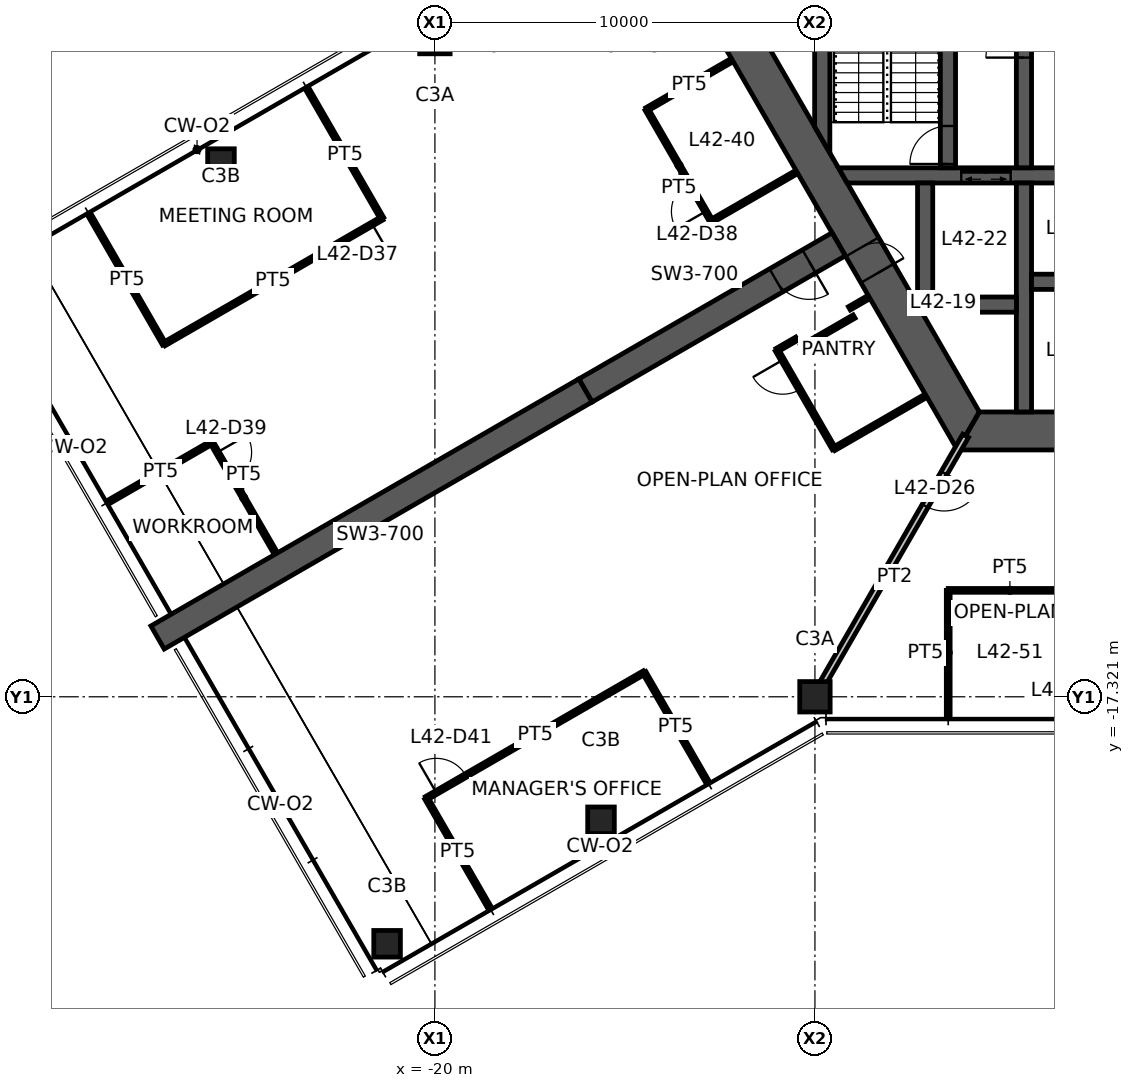
"""IFC4 building model, lengths in metres.
Left out: names, types, materials, properties, quantities, classifications, styles, units other than length and angle.
Written with IfcOpenShell. Run it as: python <this file> out.ifc"""

import sys

from ifc_helpers import new_model, si_unit, direction, frame, frame_2d, origin, origin_2d, place, context, subcontext, project, spatial, polyline, rectangle, hollow_rectangle, outline, extrude, element, fill, save


model = new_model("IFC4")
c1 = context("Model", 3, precision=1e-05, world=origin(), true_north=direction((0.0, 1.0)))
c2 = subcontext(c1, "Body", "Model", "MODEL_VIEW")
j1 = project(units=[si_unit("LENGTHUNIT", "METRE"), si_unit("PLANEANGLEUNIT", "RADIAN")], contexts=[c1])
p1 = place(None, origin())
s1 = spatial("IfcSite", under=j1, at=p1, CompositionType="ELEMENT")
p2 = place(p1, origin())
s2 = spatial("IfcBuilding", under=s1, at=p2, CompositionType="ELEMENT")
p3 = place(p2, frame((0.0, 0.0, 168.2)))
s3 = spatial("IfcBuildingStorey", under=s2, at=p3, CompositionType="ELEMENT", Elevation=168.2)
for number, where, z_axis, x_axis in (
    (1, (-20.0, 0.0, 0.0), (0.0, 0.0, 1.0), (1.0, 0.0, 0.0)),
    (2, (-10.0, -17.321, 0.0), (0.0, 0.0, 1.0), (1.0, 0.0, 0.0)),
):
    element("IfcColumn", number, at=place(p3, frame(where, z_axis=z_axis, x_axis=x_axis)), inside=s3, PredefinedType="COLUMN", context=c2, shape_type="SweptSolid", body=[
        extrude(hollow_rectangle(XDim=0.8, YDim=0.8, WallThickness=0.045, at=origin_2d()), origin(), (0.0, 0.0, 1.0), 3.9),
    ])
for number, where, z_axis, x_axis in (
    (3, (-25.629, -3.25, 0.0), (0.0, 0.0, 1.0), (1.0, 0.0, 0.0)),
    (4, (-15.629, -20.571, 0.0), (0.0, 0.0, 1.0), (1.0, 0.0, 0.0)),
    (5, (-21.258, -23.821, 0.0), (0.0, 0.0, 1.0), (1.0, 0.0, 0.0)),
):
    element("IfcColumn", number, at=place(p3, frame(where, z_axis=z_axis, x_axis=x_axis)), inside=s3, PredefinedType="COLUMN", context=c2, shape_type="SweptSolid", body=[
        extrude(hollow_rectangle(XDim=0.7, YDim=0.7, WallThickness=0.036, at=origin_2d()), origin(), (0.0, 0.0, 1.0), 3.9),
    ])
p4 = place(p3, frame((-11.922, 0.0, 0.0), z_axis=(0.0, 0.0, 1.0), x_axis=(0.500004296715, -0.866022923061, 0.0)))
e6 = element("IfcWall", 6, at=p4, inside=s3, PredefinedType="SHEAR", context=c2, shape_type="SweptSolid", body=[
    extrude(outline(polyline([(-0.289, -0.5), (6.331, -0.5), (7.131, -0.5), (12.211, -0.5), (11.634, 0.5), (7.131, 0.5), (6.331, 0.5), (0.289, 0.5), (-0.289, -0.5)])), origin(), (0.0, 0.0, 1.0), 3.9),
])
p5 = place(p4, frame((6.331, 0.0, 0.0)))
e7 = element("IfcOpeningElement", 7, at=p5, cuts=e6, PredefinedType="OPENING", context=c2, shape_type="SweptSolid", body=[
    extrude(rectangle(XDim=0.8, YDim=2.1, at=frame_2d((0.4, 1.05))), frame((0.0, 0.51, 0.0), z_axis=(0.0, -1.0, 0.0), x_axis=(1.0, 0.0, 0.0)), (0.0, 0.0, 1.0), 1.02),
])
p6 = place(p3, frame((-5.961, -10.325, 0.0), z_axis=(0.0, 0.0, 1.0), x_axis=(1.0, 0.0, 0.0)))
e8 = element("IfcWall", 8, at=p6, inside=s3, PredefinedType="SHEAR", context=c2, shape_type="SweptSolid", body=[
    extrude(outline(polyline([(-0.289, -0.5), (5.461, -0.5), (6.461, -0.5), (12.211, -0.5), (11.634, 0.5), (6.461, 0.5), (5.461, 0.5), (0.289, 0.5), (-0.289, -0.5)])), origin(), (0.0, 0.0, 1.0), 3.9),
])
p7 = place(p6, frame((5.461, 0.0, 0.0)))
e9 = element("IfcOpeningElement", 9, at=p7, cuts=e8, PredefinedType="OPENING", context=c2, shape_type="SweptSolid", body=[
    extrude(rectangle(XDim=1.0, YDim=2.1, at=frame_2d((0.5, 1.05))), frame((0.0, 0.51, 0.0), z_axis=(0.0, -1.0, 0.0), x_axis=(1.0, 0.0, 0.0)), (0.0, 0.0, 1.0), 1.02),
])
p8 = place(p3, frame((-9.375, -5.413, 0.0), z_axis=(0.0, 0.0, 1.0), x_axis=(-0.866032377459, -0.499987921047, 0.0)))
e10 = element("IfcWall", 10, at=p8, inside=s3, PredefinedType="SHEAR", context=c2, shape_type="SweptSolid", body=[
    extrude(rectangle(XDim=7.696, YDim=0.7, at=frame_2d((3.848, 0.0))), origin(), (0.0, 0.0, 1.0), 3.9),
])
p9 = place(p8, frame((0.9, 0.0, 0.0)))
e11 = element("IfcOpeningElement", 11, at=p9, cuts=e10, PredefinedType="OPENING", context=c2, shape_type="SweptSolid", body=[
    extrude(rectangle(XDim=1.0, YDim=2.1, at=frame_2d((0.5, 1.05))), frame((0.0, 0.36, 0.0), z_axis=(0.0, -1.0, 0.0), x_axis=(1.0, 0.0, 0.0)), (0.0, 0.0, 1.0), 0.72),
])
p10 = place(p3, frame((-16.039, -9.26, 0.0), z_axis=(0.0, 0.0, 1.0), x_axis=(-0.866024837091, -0.50000098154, 0.0)))
e12 = element("IfcWall", 12, at=p10, inside=s3, PredefinedType="SHEAR", context=c2, shape_type="SweptSolid", body=[
    extrude(rectangle(XDim=13.0, YDim=0.7, at=frame_2d((6.5, 0.0))), origin(), (0.0, 0.0, 1.0), 3.9),
])
p11 = place(p3, frame((-9.266, -3.6, 0.0), z_axis=(0.0, 0.0, 1.0), x_axis=(1.0, 0.0, 0.0)))
e13 = element("IfcWall", 13, at=p11, inside=s3, PredefinedType="SHEAR", context=c2, shape_type="SweptSolid", body=[
    extrude(outline(polyline([(0.115, -0.2), (3.116, -0.2), (4.417, -0.2), (5.667, -0.2), (6.767, -0.2), (7.866, -0.2), (7.866, 0.2), (6.767, 0.2), (5.667, 0.2), (4.417, 0.2), (3.116, 0.2), (-0.115, 0.2), (0.115, -0.2)])), origin(), (0.0, 0.0, 1.0), 3.9),
])
p12 = place(p11, frame((5.667, 0.0, 0.0)))
e14 = element("IfcOpeningElement", 14, at=p12, cuts=e13, PredefinedType="OPENING", context=c2, shape_type="SweptSolid", body=[
    extrude(rectangle(XDim=1.1, YDim=2.1, at=frame_2d((0.55, 1.05))), frame((0.0, 0.21, 0.0), z_axis=(0.0, -1.0, 0.0), x_axis=(1.0, 0.0, 0.0)), (0.0, 0.0, 1.0), 0.42),
])
p13 = place(p11, frame((3.116, 0.0, 0.0)))
e15 = element("IfcOpeningElement", 15, at=p13, cuts=e13, PredefinedType="OPENING", context=c2, shape_type="SweptSolid", body=[
    extrude(rectangle(XDim=1.3, YDim=2.1, at=frame_2d((0.65, 1.05))), frame((0.0, 0.21, 0.0), z_axis=(0.0, -1.0, 0.0), x_axis=(1.0, 0.0, 0.0)), (0.0, 0.0, 1.0), 0.42),
])
p14 = place(p3, frame((-4.5, -3.4, 0.0), z_axis=(0.0, 0.0, 1.0), x_axis=(0.0, 1.0, 0.0)))
e16 = element("IfcWall", 16, at=p14, inside=s3, PredefinedType="SHEAR", context=c2, shape_type="SweptSolid", body=[
    extrude(rectangle(XDim=6.8, YDim=0.4, at=frame_2d((3.4, 0.0))), origin(), (0.0, 0.0, 1.0), 3.9),
])
p15 = place(p14, frame((2.9, 0.0, 0.0)))
e17 = element("IfcOpeningElement", 17, at=p15, cuts=e16, PredefinedType="OPENING", context=c2, shape_type="SweptSolid", body=[
    extrude(rectangle(XDim=1.0, YDim=2.1, at=frame_2d((0.5, 1.05))), frame((0.0, 0.21, 0.0), z_axis=(0.0, -1.0, 0.0), x_axis=(1.0, 0.0, 0.0)), (0.0, 0.0, 1.0), 0.42),
])
p16 = place(p3, frame((-6.5, -3.4, 0.0), z_axis=(0.0, 0.0, 1.0), x_axis=(0.0, 1.0, 0.0)))
e18 = element("IfcWall", 18, at=p16, inside=s3, PredefinedType="SHEAR", context=c2, shape_type="SweptSolid", body=[
    extrude(rectangle(XDim=6.8, YDim=0.4, at=frame_2d((3.4, 0.0))), origin(), (0.0, 0.0, 1.0), 3.9),
])
p17 = place(p16, frame((0.1, 0.0, 0.0)))
e19 = element("IfcOpeningElement", 19, at=p17, cuts=e18, PredefinedType="OPENING", context=c2, shape_type="SweptSolid", body=[
    extrude(rectangle(XDim=1.0, YDim=2.1, at=frame_2d((0.5, 1.05))), frame((0.0, 0.21, 0.0), z_axis=(0.0, -1.0, 0.0), x_axis=(1.0, 0.0, 0.0)), (0.0, 0.0, 1.0), 0.42),
])
p18 = place(p3, frame((-4.5, -3.8, 0.0), z_axis=(0.0, 0.0, 1.0), x_axis=(0.0, -1.0, 0.0)))
e20 = element("IfcWall", 20, at=p18, inside=s3, PredefinedType="SHEAR", context=c2, shape_type="SweptSolid", body=[
    extrude(rectangle(XDim=6.025, YDim=0.4, at=frame_2d((3.012, 0.0))), origin(), (0.0, 0.0, 1.0), 3.9),
])
p19 = place(p3, frame((-4.3, -6.4, 0.0), z_axis=(0.0, 0.0, 1.0), x_axis=(1.0, 0.0, 0.0)))
e21 = element("IfcWall", 21, at=p19, inside=s3, PredefinedType="SHEAR", context=c2, shape_type="SweptSolid", body=[
    extrude(rectangle(XDim=2.5, YDim=0.4, at=frame_2d((1.25, 0.0))), origin(), (0.0, 0.0, 1.0), 3.9),
])
p20 = place(p3, frame((-6.9, -7.0, 0.0), z_axis=(0.0, 0.0, 1.0), x_axis=(1.0, 0.0, 0.0)))
e22 = element("IfcWall", 22, at=p20, inside=s3, PredefinedType="SHEAR", context=c2, shape_type="SweptSolid", body=[
    extrude(rectangle(XDim=2.2, YDim=0.4, at=frame_2d((1.1, 0.0))), origin(), (0.0, 0.0, 1.0), 3.9),
])
p21 = place(p3, frame((-7.1, -3.8, 0.0), z_axis=(0.0, 0.0, 1.0), x_axis=(0.0, -1.0, 0.0)))
e23 = element("IfcWall", 23, at=p21, inside=s3, PredefinedType="SHEAR", context=c2, shape_type="SweptSolid", body=[
    extrude(outline(polyline([(0.0, -0.2), (3.206, -0.2), (3.4, 0.0), (3.4, 0.2), (0.0, 0.2), (0.0, -0.2)])), origin(), (0.0, 0.0, 1.0), 3.9),
])
p22 = place(p3, frame((-9.808, -2.662, 0.0), z_axis=(0.0, 0.0, 1.0), x_axis=(0.0, 1.0, 0.0)))
e24 = element("IfcWall", 24, at=p22, inside=s3, PredefinedType="SHEAR", context=c2, shape_type="SweptSolid", body=[
    extrude(outline(polyline([(-0.346, -0.2), (5.671, -0.2), (4.978, 0.2), (0.346, 0.2), (-0.346, -0.2)])), origin(), (0.0, 0.0, 1.0), 3.9),
])
p23 = place(p3, frame((-6.035, -10.453, 0.0), z_axis=(0.0, 0.0, 1.0), x_axis=(-0.499989830942, -0.866031274813, 0.0)))
e25 = element("IfcWall", 25, at=p23, inside=s3, PredefinedType="PARTITIONING", context=c2, shape_type="SweptSolid", body=[
    extrude(rectangle(XDim=7.93, YDim=0.175, at=frame_2d((3.965, 0.0))), origin(), (0.0, 0.0, 1.0), 3.05),
])
p24 = place(p23, frame((1.13, 0.0, 0.0)))
e26 = element("IfcOpeningElement", 26, at=p24, cuts=e25, PredefinedType="OPENING", context=c2, shape_type="SweptSolid", body=[
    extrude(rectangle(XDim=1.0, YDim=2.1, at=frame_2d((0.5, 1.05))), frame((0.0, 0.098, 0.0), z_axis=(0.0, -1.0, 0.0), x_axis=(1.0, 0.0, 0.0)), (0.0, 0.0, 1.0), 0.195),
])
p25 = place(p3, frame((-27.125, -8.04, 0.0), z_axis=(0.0, 0.0, 1.0), x_axis=(-0.499978621081, 0.866037746557, 0.0)))
e27 = element("IfcWall", 27, at=p25, inside=s3, PredefinedType="PARTITIONING", context=c2, shape_type="SweptSolid", body=[
    extrude(rectangle(XDim=3.905, YDim=0.1, at=frame_2d((1.953, 0.0))), origin(), (0.0, 0.0, 1.0), 2.95),
])
p26 = place(p3, frame((-23.332, -1.37, 0.0), z_axis=(0.0, 0.0, 1.0), x_axis=(0.500043804875, -0.866000111551, 0.0)))
e28 = element("IfcWall", 28, at=p26, inside=s3, PredefinedType="PARTITIONING", context=c2, shape_type="SweptSolid", body=[
    extrude(rectangle(XDim=3.88, YDim=0.1, at=frame_2d((1.94, 0.0))), origin(), (0.0, 0.0, 1.0), 2.95),
])
p27 = place(p3, frame((-21.392, -4.73, 0.0), z_axis=(0.0, 0.0, 1.0), x_axis=(-0.866030817826, -0.499990622488, 0.0)))
e29 = element("IfcWall", 29, at=p27, inside=s3, PredefinedType="PARTITIONING", context=c2, shape_type="SweptSolid", body=[
    extrude(rectangle(XDim=6.62, YDim=0.1, at=frame_2d((3.31, 0.0))), origin(), (0.0, 0.0, 1.0), 2.95),
])
p28 = place(p27, frame((0.3, 0.0, 0.0)))
e30 = element("IfcOpeningElement", 30, at=p28, cuts=e29, PredefinedType="OPENING", context=c2, shape_type="SweptSolid", body=[
    extrude(rectangle(XDim=0.9, YDim=2.1, at=frame_2d((0.45, 1.05))), frame((0.0, 0.06, 0.0), z_axis=(0.0, -1.0, 0.0), x_axis=(1.0, 0.0, 0.0)), (0.0, 0.0, 1.0), 0.12),
])
p29 = place(p3, frame((-14.427, -1.863, 0.0), z_axis=(0.0, 0.0, 1.0), x_axis=(0.866045356598, 0.49996543912, 0.0)))
e31 = element("IfcWall", 31, at=p29, inside=s3, PredefinedType="PARTITIONING", context=c2, shape_type="SweptSolid", body=[
    extrude(rectangle(XDim=2.58, YDim=0.1, at=frame_2d((1.29, 0.0))), origin(), (0.0, 0.0, 1.0), 2.95),
])
p30 = place(p3, frame((-12.726, -4.807, 0.0), z_axis=(0.0, 0.0, 1.0), x_axis=(-0.500062241894, 0.865989465428, 0.0)))
e32 = element("IfcWall", 32, at=p30, inside=s3, PredefinedType="PARTITIONING", context=c2, shape_type="SweptSolid", body=[
    extrude(rectangle(XDim=3.4, YDim=0.1, at=frame_2d((1.7, 0.0))), origin(), (0.0, 0.0, 1.0), 2.95),
])
p31 = place(p30, frame((0.3, 0.0, 0.0)))
e33 = element("IfcOpeningElement", 33, at=p31, cuts=e32, PredefinedType="OPENING", context=c2, shape_type="SweptSolid", body=[
    extrude(rectangle(XDim=0.9, YDim=2.1, at=frame_2d((0.45, 1.05))), frame((0.0, 0.06, 0.0), z_axis=(0.0, -1.0, 0.0), x_axis=(1.0, 0.0, 0.0)), (0.0, 0.0, 1.0), 0.12),
])
p32 = place(p3, frame((-10.492, -3.517, 0.0), z_axis=(0.0, 0.0, 1.0), x_axis=(-0.866021702275, -0.500006411147, 0.0)))
e34 = element("IfcWall", 34, at=p32, inside=s3, PredefinedType="PARTITIONING", context=c2, shape_type="SweptSolid", body=[
    extrude(rectangle(XDim=2.58, YDim=0.1, at=frame_2d((1.29, 0.0))), origin(), (0.0, 0.0, 1.0), 2.95),
])
p33 = place(p3, frame((-28.562, -12.18, 0.0), z_axis=(0.0, 0.0, 1.0), x_axis=(0.866042875753, 0.499969736442, 0.0)))
e35 = element("IfcWall", 35, at=p33, inside=s3, PredefinedType="PARTITIONING", context=c2, shape_type="SweptSolid", body=[
    extrude(rectangle(XDim=3.105, YDim=0.1, at=frame_2d((1.553, 0.0))), origin(), (0.0, 0.0, 1.0), 2.95),
])
p34 = place(p3, frame((-25.873, -10.627, 0.0), z_axis=(0.0, 0.0, 1.0), x_axis=(0.5000115033, -0.866018762249, 0.0)))
e36 = element("IfcWall", 36, at=p34, inside=s3, PredefinedType="PARTITIONING", context=c2, shape_type="SweptSolid", body=[
    extrude(rectangle(XDim=3.363, YDim=0.1, at=frame_2d((1.682, 0.0))), origin(), (0.0, 0.0, 1.0), 2.95),
])
p35 = place(p34, frame((0.3, 0.0, 0.0)))
e37 = element("IfcOpeningElement", 37, at=p35, cuts=e36, PredefinedType="OPENING", context=c2, shape_type="SweptSolid", body=[
    extrude(rectangle(XDim=0.9, YDim=2.1, at=frame_2d((0.45, 1.05))), frame((0.0, 0.06, 0.0), z_axis=(0.0, -1.0, 0.0), x_axis=(1.0, 0.0, 0.0)), (0.0, 0.0, 1.0), 0.12),
])
p36 = place(p3, frame((-11.0, -8.198, 0.0), z_axis=(0.0, 0.0, 1.0), x_axis=(0.866131372301, 0.499816412211, 0.0)))
e38 = element("IfcWall", 38, at=p36, inside=s3, PredefinedType="PARTITIONING", context=c2, shape_type="SweptSolid", body=[
    extrude(rectangle(XDim=0.6, YDim=0.1, at=frame_2d((0.3, 0.0))), origin(), (0.0, 0.0, 1.0), 2.95),
])
p37 = place(p3, frame((-10.355, -8.115, 0.0), z_axis=(0.0, 0.0, 1.0), x_axis=(0.866094119867, 0.499880961361, 0.0)))
e39 = element("IfcWall", 39, at=p37, inside=s3, PredefinedType="PARTITIONING", context=c2, shape_type="SweptSolid", body=[
    extrude(rectangle(XDim=1.6, YDim=0.1, at=frame_2d((0.8, 0.0))), origin(), (0.0, 0.0, 1.0), 2.95),
])
p38 = place(p3, frame((-9.5, -10.796, 0.0), z_axis=(0.0, 0.0, 1.0), x_axis=(-0.499990139034, 0.866031096941, 0.0)))
e40 = element("IfcWall", 40, at=p38, inside=s3, PredefinedType="PARTITIONING", context=c2, shape_type="SweptSolid", body=[
    extrude(rectangle(XDim=3.0, YDim=0.1, at=frame_2d((1.5, 0.0))), origin(), (0.0, 0.0, 1.0), 2.95),
])
p39 = place(p38, frame((1.8, 0.0, 0.0)))
e41 = element("IfcOpeningElement", 41, at=p39, cuts=e40, PredefinedType="OPENING", context=c2, shape_type="SweptSolid", body=[
    extrude(rectangle(XDim=0.9, YDim=2.1, at=frame_2d((0.45, 1.05))), frame((0.0, 0.06, 0.0), z_axis=(0.0, -1.0, 0.0), x_axis=(1.0, 0.0, 0.0)), (0.0, 0.0, 1.0), 0.12),
])
p40 = place(p3, frame((-9.094, -7.098, 0.0), z_axis=(0.0, 0.0, 1.0), x_axis=(0.865954211699, 0.50012328804, 0.0)))
e42 = element("IfcWall", 42, at=p40, inside=s3, PredefinedType="PARTITIONING", context=c2, shape_type="SweptSolid", body=[
    extrude(rectangle(XDim=0.58, YDim=0.1, at=frame_2d((0.29, 0.0))), origin(), (0.0, 0.0, 1.0), 2.95),
])
p41 = place(p3, frame((-7.092, -9.406, 0.0), z_axis=(0.0, 0.0, 1.0), x_axis=(-0.86603494908, -0.499983466698, 0.0)))
e43 = element("IfcWall", 43, at=p41, inside=s3, PredefinedType="PARTITIONING", context=c2, shape_type="SweptSolid", body=[
    extrude(rectangle(XDim=2.78, YDim=0.1, at=frame_2d((1.39, 0.0))), origin(), (0.0, 0.0, 1.0), 2.95),
])
p42 = place(p3, frame((-20.225, -19.991, 0.0), z_axis=(0.0, 0.0, 1.0), x_axis=(0.866030817826, 0.499990622488, 0.0)))
e44 = element("IfcWall", 44, at=p42, inside=s3, PredefinedType="PARTITIONING", context=c2, shape_type="SweptSolid", body=[
    extrude(rectangle(XDim=6.62, YDim=0.1, at=frame_2d((3.31, 0.0))), origin(), (0.0, 0.0, 1.0), 2.95),
])
p43 = place(p42, frame((0.3, 0.0, 0.0)))
e45 = element("IfcOpeningElement", 45, at=p43, cuts=e44, PredefinedType="OPENING", context=c2, shape_type="SweptSolid", body=[
    extrude(rectangle(XDim=0.9, YDim=2.1, at=frame_2d((0.45, 1.05))), frame((0.0, 0.06, 0.0), z_axis=(0.0, -1.0, 0.0), x_axis=(1.0, 0.0, 0.0)), (0.0, 0.0, 1.0), 0.12),
])
p44 = place(p3, frame((-18.585, -22.831, 0.0), z_axis=(0.0, 0.0, 1.0), x_axis=(-0.50002956483, 0.866008333849, 0.0)))
e46 = element("IfcWall", 46, at=p44, inside=s3, PredefinedType="PARTITIONING", context=c2, shape_type="SweptSolid", body=[
    extrude(rectangle(XDim=3.28, YDim=0.1, at=frame_2d((1.64, 0.0))), origin(), (0.0, 0.0, 1.0), 2.95),
])
p45 = place(p3, frame((-14.492, -16.681, 0.0), z_axis=(0.0, 0.0, 1.0), x_axis=(0.500008057651, -0.866020751647, 0.0)))
e47 = element("IfcWall", 47, at=p45, inside=s3, PredefinedType="PARTITIONING", context=c2, shape_type="SweptSolid", body=[
    extrude(rectangle(XDim=3.305, YDim=0.1, at=frame_2d((1.653, 0.0))), origin(), (0.0, 0.0, 1.0), 2.95),
])
p46 = place(p3, frame((-6.493, -17.801, 0.0), z_axis=(0.0, 0.0, 1.0), x_axis=(0.0, 1.0, 0.0)))
e48 = element("IfcWall", 48, at=p46, inside=s3, PredefinedType="PARTITIONING", context=c2, shape_type="SweptSolid", body=[
    extrude(rectangle(XDim=3.28, YDim=0.1, at=frame_2d((1.64, 0.0))), origin(), (0.0, 0.0, 1.0), 2.95),
])
p47 = place(p3, frame((-6.493, -14.521, 0.0), z_axis=(0.0, 0.0, 1.0), x_axis=(1.0, 0.0, 0.0)))
e49 = element("IfcWall", 49, at=p47, inside=s3, PredefinedType="PARTITIONING", context=c2, shape_type="SweptSolid", body=[
    extrude(rectangle(XDim=3.247, YDim=0.1, at=frame_2d((1.623, 0.0))), origin(), (0.0, 0.0, 1.0), 2.95),
])
p48 = place(p5, origin())
e50 = element("IfcDoor", 50, at=p48, inside=s3, OperationType="SINGLE_SWING_RIGHT", PredefinedType="DOOR", context=c2, shape_type="SweptSolid", body=[
    extrude(rectangle(XDim=0.8, YDim=2.1, at=frame_2d((0.4, 1.05))), frame((0.0, 0.025, 0.0), z_axis=(0.0, -1.0, 0.0), x_axis=(1.0, 0.0, 0.0)), (0.0, 0.0, 1.0), 0.05),
])
fill(e7, e50)
p49 = place(p15, origin())
e51 = element("IfcDoor", 51, at=p49, inside=s3, OperationType="SINGLE_SWING_LEFT", PredefinedType="DOOR", context=c2, shape_type="SweptSolid", body=[
    extrude(rectangle(XDim=1.0, YDim=2.1, at=frame_2d((0.5, 1.05))), frame((0.0, 0.025, 0.0), z_axis=(0.0, -1.0, 0.0), x_axis=(1.0, 0.0, 0.0)), (0.0, 0.0, 1.0), 0.05),
])
fill(e17, e51)
p50 = place(p17, origin())
e52 = element("IfcDoor", 52, at=p50, inside=s3, OperationType="SINGLE_SWING_LEFT", PredefinedType="DOOR", context=c2, shape_type="SweptSolid", body=[
    extrude(rectangle(XDim=1.0, YDim=2.1, at=frame_2d((0.5, 1.05))), frame((0.0, 0.025, 0.0), z_axis=(0.0, -1.0, 0.0), x_axis=(1.0, 0.0, 0.0)), (0.0, 0.0, 1.0), 0.05),
])
fill(e19, e52)
p51 = place(p9, origin())
e53 = element("IfcDoor", 53, at=p51, inside=s3, OperationType="SINGLE_SWING_LEFT", PredefinedType="DOOR", context=c2, shape_type="SweptSolid", body=[
    extrude(rectangle(XDim=1.0, YDim=2.1, at=frame_2d((0.5, 1.05))), frame((0.0, 0.025, 0.0), z_axis=(0.0, -1.0, 0.0), x_axis=(1.0, 0.0, 0.0)), (0.0, 0.0, 1.0), 0.05),
])
fill(e11, e53)
p52 = place(p24, origin())
e54 = element("IfcDoor", 54, at=p52, inside=s3, OperationType="SINGLE_SWING_LEFT", PredefinedType="DOOR", context=c2, shape_type="SweptSolid", body=[
    extrude(rectangle(XDim=1.0, YDim=2.1, at=frame_2d((0.5, 1.05))), frame((0.0, 0.025, 0.0), z_axis=(0.0, -1.0, 0.0), x_axis=(1.0, 0.0, 0.0)), (0.0, 0.0, 1.0), 0.05),
])
fill(e26, e54)
p53 = place(p28, origin())
e55 = element("IfcDoor", 55, at=p53, inside=s3, OperationType="SINGLE_SWING_LEFT", PredefinedType="DOOR", context=c2, shape_type="SweptSolid", body=[
    extrude(rectangle(XDim=0.9, YDim=2.1, at=frame_2d((0.45, 1.05))), frame((0.0, 0.025, 0.0), z_axis=(0.0, -1.0, 0.0), x_axis=(1.0, 0.0, 0.0)), (0.0, 0.0, 1.0), 0.05),
])
fill(e30, e55)
p54 = place(p31, origin())
e56 = element("IfcDoor", 56, at=p54, inside=s3, OperationType="SINGLE_SWING_LEFT", PredefinedType="DOOR", context=c2, shape_type="SweptSolid", body=[
    extrude(rectangle(XDim=0.9, YDim=2.1, at=frame_2d((0.45, 1.05))), frame((0.0, 0.025, 0.0), z_axis=(0.0, -1.0, 0.0), x_axis=(1.0, 0.0, 0.0)), (0.0, 0.0, 1.0), 0.05),
])
fill(e33, e56)
p55 = place(p35, origin())
e57 = element("IfcDoor", 57, at=p55, inside=s3, OperationType="SINGLE_SWING_LEFT", PredefinedType="DOOR", context=c2, shape_type="SweptSolid", body=[
    extrude(rectangle(XDim=0.9, YDim=2.1, at=frame_2d((0.45, 1.05))), frame((0.0, 0.025, 0.0), z_axis=(0.0, -1.0, 0.0), x_axis=(1.0, 0.0, 0.0)), (0.0, 0.0, 1.0), 0.05),
])
fill(e37, e57)
p56 = place(p39, origin())
e58 = element("IfcDoor", 58, at=p56, inside=s3, OperationType="SINGLE_SWING_RIGHT", PredefinedType="DOOR", context=c2, shape_type="SweptSolid", body=[
    extrude(rectangle(XDim=0.9, YDim=2.1, at=frame_2d((0.45, 1.05))), frame((0.0, 0.025, 0.0), z_axis=(0.0, -1.0, 0.0), x_axis=(1.0, 0.0, 0.0)), (0.0, 0.0, 1.0), 0.05),
])
fill(e41, e58)
p57 = place(p43, origin())
e59 = element("IfcDoor", 59, at=p57, inside=s3, OperationType="SINGLE_SWING_LEFT", PredefinedType="DOOR", context=c2, shape_type="SweptSolid", body=[
    extrude(rectangle(XDim=0.9, YDim=2.1, at=frame_2d((0.45, 1.05))), frame((0.0, 0.025, 0.0), z_axis=(0.0, -1.0, 0.0), x_axis=(1.0, 0.0, 0.0)), (0.0, 0.0, 1.0), 0.05),
])
fill(e45, e59)
p58 = place(p13, origin())
e60 = element("IfcDoor", 60, at=p58, inside=s3, OperationType="DOUBLE_DOOR_SLIDING", PredefinedType="DOOR", context=c2, shape_type="SweptSolid", body=[
    extrude(rectangle(XDim=1.3, YDim=2.1, at=frame_2d((0.65, 1.05))), frame((0.0, 0.025, 0.0), z_axis=(0.0, -1.0, 0.0), x_axis=(1.0, 0.0, 0.0)), (0.0, 0.0, 1.0), 0.05),
])
fill(e15, e60)
save(model, sys.argv[1])
